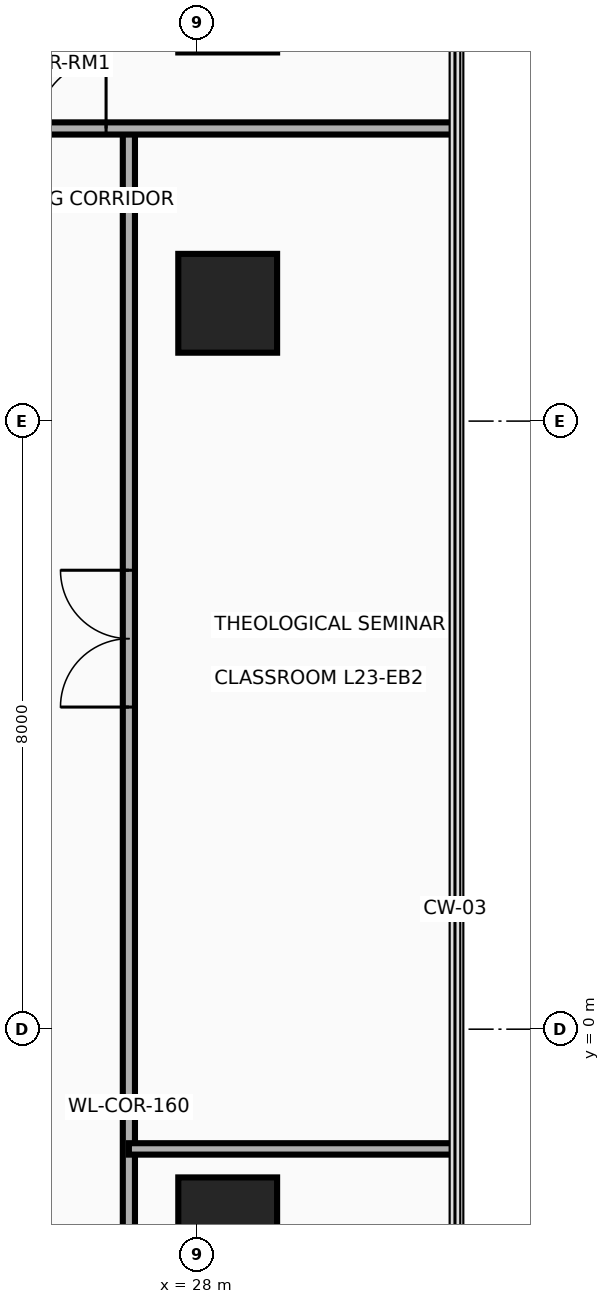
"""IFC4 building model, lengths in metres.
Left out: names, types, materials, properties, quantities, classifications, styles, units other than length and angle.
Written with IfcOpenShell. Run it as: python <this file> out.ifc"""

import sys

from ifc_helpers import new_model, si_unit, direction, frame, frame_2d, origin, origin_2d, place, context, subcontext, project, spatial, rectangle, circle, extrude, source, transform, mapped, element, fill, save


model = new_model("IFC4")
c1 = context("Model", 3, precision=1e-05, world=origin(), true_north=direction((0.0, 1.0)))
c2 = subcontext(c1, "Body", "Model", "MODEL_VIEW")
j1 = project(units=[si_unit("LENGTHUNIT", "METRE"), si_unit("PLANEANGLEUNIT", "RADIAN")], contexts=[c1])
p1 = place(None, origin())
s1 = spatial("IfcSite", under=j1, at=p1, CompositionType="ELEMENT")
p2 = place(p1, origin())
s2 = spatial("IfcBuilding", under=s1, at=p2, CompositionType="ELEMENT")
p3 = place(p2, frame((0.0, 0.0, 92.6)))
s3 = spatial("IfcBuildingStorey", under=s2, at=p3, CompositionType="ELEMENT", Elevation=92.6)
m1 = source(origin(), c2, "Body", "SweptSolid", [
    extrude(circle(Radius=0.65, at=origin_2d()), origin(), (0.0, 0.0, 1.0), 3.7),
])
for number, where, z_axis, x_axis in (
    (1, (28.4, -2.6, 0.0), (0.0, 0.0, 1.0), (1.0, 0.0, 0.0)),
    (2, (28.4, 9.55, 0.0), (0.0, 0.0, 1.0), (1.0, 0.0, 0.0)),
):
    element("IfcColumn", number, at=place(p3, frame(where, z_axis=z_axis, x_axis=x_axis)), inside=s3, PredefinedType="COLUMN", context=c2, shape_type="MappedRepresentation", body=[
        mapped(m1, transform((0.0, 0.0, 0.0), x_axis=(1.0, 0.0, 0.0), y_axis=(0.0, 1.0, 0.0), z_axis=(0.0, 0.0, 1.0), scale=1.0)),
    ])
p4 = place(p3, frame((27.1, -13.89, 0.0), z_axis=(0.0, 0.0, 1.0), x_axis=(0.0, 1.0, 0.0)))
e3 = element("IfcWall", 3, at=p4, inside=s3, PredefinedType="PARTITIONING", context=c2, shape_type="SweptSolid", body=[
    extrude(rectangle(XDim=25.74, YDim=0.16, at=frame_2d((12.87, 0.0))), origin(), (0.0, 0.0, 1.0), 2.583),
])
p5 = place(p4, frame((5.258, 0.0, 0.0)))
e4 = element("IfcOpeningElement", 4, at=p5, cuts=e3, PredefinedType="OPENING", context=c2, shape_type="SweptSolid", body=[
    extrude(rectangle(XDim=1.8, YDim=2.15, at=frame_2d((0.9, 1.075))), frame((0.0, 0.095, 0.0), z_axis=(0.0, -1.0, 0.0), x_axis=(1.0, 0.0, 0.0)), (0.0, 0.0, 1.0), 0.19),
])
p6 = place(p4, frame((18.128, 0.0, 0.0)))
e5 = element("IfcOpeningElement", 5, at=p6, cuts=e3, PredefinedType="OPENING", context=c2, shape_type="SweptSolid", body=[
    extrude(rectangle(XDim=1.8, YDim=2.15, at=frame_2d((0.9, 1.075))), frame((0.0, 0.095, 0.0), z_axis=(0.0, -1.0, 0.0), x_axis=(1.0, 0.0, 0.0)), (0.0, 0.0, 1.0), 0.19),
])
p7 = place(p3, frame((25.6, 11.85, 0.0), z_axis=(0.0, 0.0, 1.0), x_axis=(1.0, 0.0, 0.0)))
e6 = element("IfcWall", 6, at=p7, inside=s3, PredefinedType="PARTITIONING", context=c2, shape_type="SweptSolid", body=[
    extrude(rectangle(XDim=5.79, YDim=0.16, at=frame_2d((2.895, 0.0))), origin(), (0.0, 0.0, 1.0), 2.896),
])
p8 = place(p7, frame((0.3, 0.0, 0.0)))
e7 = element("IfcOpeningElement", 7, at=p8, cuts=e6, PredefinedType="OPENING", context=c2, shape_type="SweptSolid", body=[
    extrude(rectangle(XDim=0.9, YDim=2.1, at=frame_2d((0.45, 1.05))), frame((0.0, 0.095, 0.0), z_axis=(0.0, -1.0, 0.0), x_axis=(1.0, 0.0, 0.0)), (0.0, 0.0, 1.0), 0.19),
])
p9 = place(p3, frame((27.1, -1.575, 0.0), z_axis=(0.0, 0.0, 1.0), x_axis=(1.0, 0.0, 0.0)))
e8 = element("IfcWall", 8, at=p9, inside=s3, PredefinedType="PARTITIONING", context=c2, shape_type="SweptSolid", body=[
    extrude(rectangle(XDim=4.29, YDim=0.15, at=frame_2d((2.145, 0.0))), origin(), (0.0, 0.0, 1.0), 2.896),
])
p10 = place(p8, origin())
e9 = element("IfcDoor", 9, at=p10, inside=s3, OperationType="SINGLE_SWING_RIGHT", PredefinedType="DOOR", context=c2, shape_type="SweptSolid", body=[
    extrude(rectangle(XDim=0.9, YDim=2.1, at=frame_2d((0.45, 1.05))), frame((0.0, 0.025, 0.0), z_axis=(0.0, -1.0, 0.0), x_axis=(1.0, 0.0, 0.0)), (0.0, 0.0, 1.0), 0.05),
])
fill(e7, e9)
p11 = place(p6, origin())
e10 = element("IfcDoor", 10, at=p11, inside=s3, OperationType="DOUBLE_DOOR_SINGLE_SWING", PredefinedType="DOOR", context=c2, shape_type="SweptSolid", body=[
    extrude(rectangle(XDim=1.8, YDim=2.15, at=frame_2d((0.9, 1.075))), frame((0.0, 0.025, 0.0), z_axis=(0.0, -1.0, 0.0), x_axis=(1.0, 0.0, 0.0)), (0.0, 0.0, 1.0), 0.05),
])
fill(e5, e10)
save(model, sys.argv[1])
